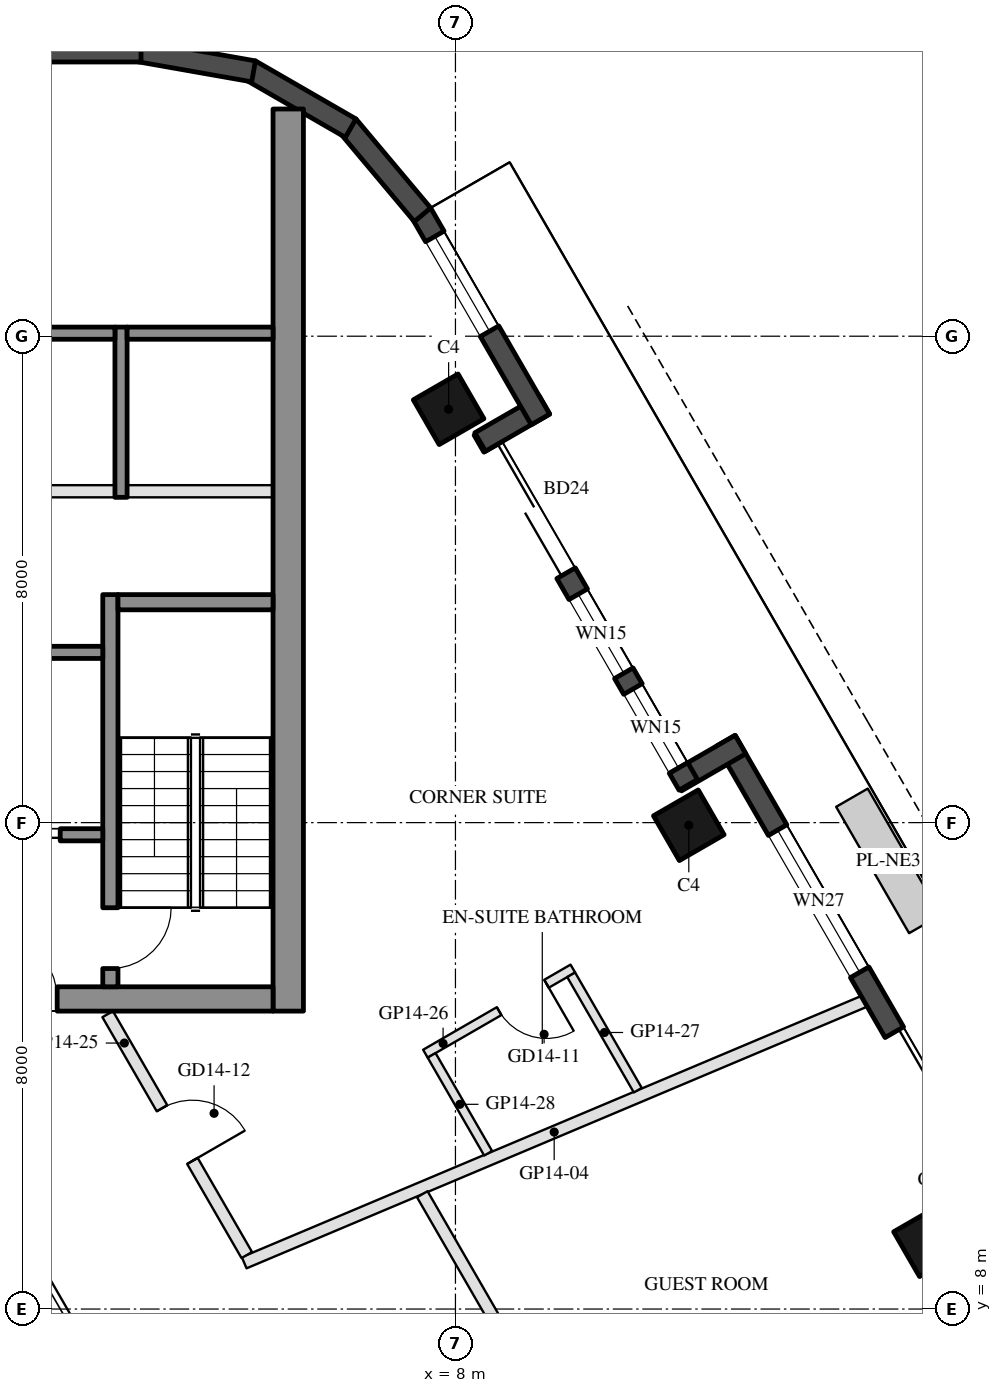
"""IFC4 building model, lengths in metres.
Left out: names, types, materials, properties, quantities, classifications, styles, units other than length and angle.
Written with IfcOpenShell. Run it as: python <this file> out.ifc"""

import sys

from ifc_helpers import new_model, si_unit, direction, frame, frame_2d, origin, origin_2d, place, context, subcontext, project, spatial, rectangle, hollow_rectangle, extrude, element, fill, save


model = new_model("IFC4")
c1 = context("Model", 3, precision=1e-05, world=origin(), true_north=direction((0.0, 1.0)))
c2 = subcontext(c1, "Body", "Model", "MODEL_VIEW")
j1 = project(units=[si_unit("LENGTHUNIT", "METRE"), si_unit("PLANEANGLEUNIT", "RADIAN")], contexts=[c1])
p1 = place(None, origin())
s1 = spatial("IfcSite", under=j1, at=p1, CompositionType="ELEMENT")
p2 = place(p1, origin())
s2 = spatial("IfcBuilding", under=s1, at=p2, CompositionType="ELEMENT")
p3 = place(p2, frame((0.0, 0.0, 161.4)))
s3 = spatial("IfcBuildingStorey", under=s2, at=p3, CompositionType="ELEMENT", Elevation=161.4)
for number, where, z_axis, x_axis in (
    (1, (15.788, 9.115, 0.0), (0.0, 0.0, 1.0), (-0.5, 0.866, 0.0)),
    (2, (11.838, 15.957, 0.0), (0.0, 0.0, 1.0), (-0.5, 0.866, 0.0)),
    (3, (7.888, 22.798, 0.0), (0.0, 0.0, 1.0), (-0.5, 0.866, 0.0)),
):
    element("IfcColumn", number, at=place(p3, frame(where, z_axis=z_axis, x_axis=x_axis)), inside=s3, PredefinedType="COLUMN", context=c2, shape_type="SweptSolid", body=[
        extrude(hollow_rectangle(XDim=0.85, YDim=0.85, WallThickness=0.04, at=origin_2d()), origin(), (0.0, 0.0, 1.0), 3.7),
    ])
p4 = place(p3, frame((17.299, 8.948, 0.0), z_axis=(0.0, 0.0, 1.0), x_axis=(-0.500010041276, 0.866019606374, 0.0)))
e4 = element("IfcWall", 4, at=p4, inside=s3, PredefinedType="SOLIDWALL", context=c2, shape_type="SweptSolid", body=[
    extrude(rectangle(XDim=9.7, YDim=0.35, at=frame_2d((4.85, 0.0))), origin(), (0.0, 0.0, 1.0), 3.55),
])
p5 = place(p4, frame((1.762, 0.0, 0.0)))
e5 = element("IfcOpeningElement", 5, at=p5, cuts=e4, PredefinedType="OPENING", context=c2, shape_type="SweptSolid", body=[
    extrude(rectangle(XDim=2.4, YDim=2.4, at=frame_2d((1.2, 1.2))), frame((0.0, 0.185, 0.0), z_axis=(0.0, -1.0, 0.0), x_axis=(1.0, 0.0, 0.0)), (0.0, 0.0, 1.0), 0.37),
])
p6 = place(p4, frame((5.301, 0.0, 0.3)))
e6 = element("IfcOpeningElement", 6, at=p6, cuts=e4, PredefinedType="OPENING", context=c2, shape_type="SweptSolid", body=[
    extrude(rectangle(XDim=2.7, YDim=2.65, at=frame_2d((1.35, 1.325))), frame((0.0, 0.185, 0.0), z_axis=(0.0, -1.0, 0.0), x_axis=(1.0, 0.0, 0.0)), (0.0, 0.0, 1.0), 0.37),
])
p7 = place(p3, frame((12.688, 17.284, 0.0), z_axis=(0.0, 0.0, 1.0), x_axis=(-0.865955602162, -0.500120880472, 0.0)))
e7 = element("IfcWall", 7, at=p7, inside=s3, PredefinedType="SOLIDWALL", context=c2, shape_type="SweptSolid", body=[
    extrude(rectangle(XDim=1.22, YDim=0.35, at=frame_2d((0.61, 0.0))), origin(), (0.0, 0.0, 1.0), 3.55),
])
p8 = place(p3, frame((11.829, 16.621, 0.0), z_axis=(0.0, 0.0, 1.0), x_axis=(-0.500003597184, 0.866023326939, 0.0)))
e8 = element("IfcWall", 8, at=p8, inside=s3, PredefinedType="SOLIDWALL", context=c2, shape_type="SweptSolid", body=[
    extrude(rectangle(XDim=6.74, YDim=0.35, at=frame_2d((3.37, 0.0))), origin(), (0.0, 0.0, 1.0), 3.55),
])
p9 = place(p8, frame((4.02, 0.0, 0.0)))
e9 = element("IfcOpeningElement", 9, at=p9, cuts=e8, PredefinedType="OPENING", context=c2, shape_type="SweptSolid", body=[
    extrude(rectangle(XDim=2.4, YDim=2.4, at=frame_2d((1.2, 1.2))), frame((0.0, 0.185, 0.0), z_axis=(0.0, -1.0, 0.0), x_axis=(1.0, 0.0, 0.0)), (0.0, 0.0, 1.0), 0.37),
])
p10 = place(p8, frame((0.32, 0.0, 0.3)))
e10 = element("IfcOpeningElement", 10, at=p10, cuts=e8, PredefinedType="OPENING", context=c2, shape_type="SweptSolid", body=[
    extrude(rectangle(XDim=1.5, YDim=2.65, at=frame_2d((0.75, 1.325))), frame((0.0, 0.185, 0.0), z_axis=(0.0, -1.0, 0.0), x_axis=(1.0, 0.0, 0.0)), (0.0, 0.0, 1.0), 0.37),
])
p11 = place(p8, frame((2.12, 0.0, 0.3)))
e11 = element("IfcOpeningElement", 11, at=p11, cuts=e8, PredefinedType="OPENING", context=c2, shape_type="SweptSolid", body=[
    extrude(rectangle(XDim=1.5, YDim=2.65, at=frame_2d((0.75, 1.325))), frame((0.0, 0.185, 0.0), z_axis=(0.0, -1.0, 0.0), x_axis=(1.0, 0.0, 0.0)), (0.0, 0.0, 1.0), 0.37),
])
p12 = place(p3, frame((8.406, 22.26, 0.0), z_axis=(0.0, 0.0, 1.0), x_axis=(0.865955602162, 0.500120880472, 0.0)))
e12 = element("IfcWall", 12, at=p12, inside=s3, PredefinedType="SOLIDWALL", context=c2, shape_type="SweptSolid", body=[
    extrude(rectangle(XDim=1.22, YDim=0.35, at=frame_2d((0.61, 0.0))), origin(), (0.0, 0.0, 1.0), 3.55),
])
p13 = place(p3, frame((9.398, 22.631, 0.0), z_axis=(0.0, 0.0, 1.0), x_axis=(-0.499954521343, 0.866051659307, 0.0)))
e13 = element("IfcWall", 13, at=p13, inside=s3, PredefinedType="SOLIDWALL", context=c2, shape_type="SweptSolid", body=[
    extrude(rectangle(XDim=3.916, YDim=0.35, at=frame_2d((1.958, 0.0))), origin(), (0.0, 0.0, 1.0), 3.55),
])
p14 = place(p13, frame((1.675, 0.0, 0.3)))
e14 = element("IfcOpeningElement", 14, at=p14, cuts=e13, PredefinedType="OPENING", context=c2, shape_type="SweptSolid", body=[
    extrude(rectangle(XDim=1.8, YDim=2.65, at=frame_2d((0.9, 1.325))), frame((0.0, 0.185, 0.0), z_axis=(0.0, -1.0, 0.0), x_axis=(1.0, 0.0, 0.0)), (0.0, 0.0, 1.0), 0.37),
])
p15 = place(p3, frame((7.458, 25.998, 0.0), z_axis=(0.0, 0.0, 1.0), x_axis=(-0.642808304945, 0.766027077259, 0.0)))
e15 = element("IfcWall", 15, at=p15, inside=s3, PredefinedType="SOLIDWALL", context=c2, shape_type="SweptSolid", body=[
    extrude(rectangle(XDim=1.91, YDim=0.35, at=frame_2d((0.955, 0.0))), origin(), (0.0, 0.0, 1.0), 3.55),
])
for number, where, z_axis, x_axis in (
    (16, (6.277, 27.422, 0.0), (0.0, 0.0, 1.0), (-0.866, 0.5, 0.0)),
    (17, (4.68, 28.356, 0.0), (0.0, 0.0, 1.0), (-0.985, 0.174, 0.0)),
):
    element("IfcWall", number, at=place(p3, frame(where, z_axis=z_axis, x_axis=x_axis)), inside=s3, PredefinedType="SOLIDWALL", context=c2, shape_type="SweptSolid", body=[
        extrude(rectangle(XDim=1.91, YDim=0.35, at=frame_2d((0.955, 0.0))), origin(), (0.0, 0.0, 1.0), 3.55),
    ])
p16 = place(p3, frame((2.829, 28.685, 0.0), z_axis=(0.0, 0.0, 1.0), x_axis=(-1.0, 0.0, 0.0)))
e18 = element("IfcWall", 18, at=p16, inside=s3, PredefinedType="SOLIDWALL", context=c2, shape_type="SweptSolid", body=[
    extrude(rectangle(XDim=5.658, YDim=0.35, at=frame_2d((2.829, 0.0))), origin(), (0.0, 0.0, 1.0), 3.55),
])
p17 = place(p3, frame((5.25, 12.9, 0.0), z_axis=(0.0, 0.0, 1.0), x_axis=(0.0, 1.0, 0.0)))
e19 = element("IfcWall", 19, at=p17, inside=s3, PredefinedType="SHEAR", context=c2, shape_type="SweptSolid", body=[
    extrude(rectangle(XDim=14.837, YDim=0.5, at=frame_2d((7.418, 0.0))), origin(), (0.0, 0.0, 1.0), 3.5),
])
p18 = place(p3, frame((5.0, 13.1, 0.0), z_axis=(0.0, 0.0, 1.0), x_axis=(-1.0, 0.0, 0.0)))
e20 = element("IfcWall", 20, at=p18, inside=s3, PredefinedType="SHEAR", context=c2, shape_type="SweptSolid", body=[
    extrude(rectangle(XDim=10.0, YDim=0.4, at=frame_2d((5.0, 0.0))), origin(), (0.0, 0.0, 1.0), 3.5),
])
p19 = place(p18, frame((3.55, 0.0, 0.0)))
e21 = element("IfcOpeningElement", 21, at=p19, cuts=e20, PredefinedType="OPENING", context=c2, shape_type="SweptSolid", body=[
    extrude(rectangle(XDim=1.1, YDim=2.1, at=frame_2d((0.55, 1.05))), frame((0.0, 0.21, 0.0), z_axis=(0.0, -1.0, 0.0), x_axis=(1.0, 0.0, 0.0)), (0.0, 0.0, 1.0), 0.42),
])
p20 = place(p18, frame((5.85, 0.0, 0.0)))
e22 = element("IfcOpeningElement", 22, at=p20, cuts=e20, PredefinedType="OPENING", context=c2, shape_type="SweptSolid", body=[
    extrude(rectangle(XDim=1.4, YDim=2.1, at=frame_2d((0.7, 1.05))), frame((0.0, 0.21, 0.0), z_axis=(0.0, -1.0, 0.0), x_axis=(1.0, 0.0, 0.0)), (0.0, 0.0, 1.0), 0.42),
])
p21 = place(p3, frame((2.325, 13.3, 0.0), z_axis=(0.0, 0.0, 1.0), x_axis=(0.0, 1.0, 0.0)))
e23 = element("IfcWall", 23, at=p21, inside=s3, PredefinedType="SHEAR", context=c2, shape_type="SweptSolid", body=[
    extrude(rectangle(XDim=6.45, YDim=0.25, at=frame_2d((3.225, 0.0))), origin(), (0.0, 0.0, 1.0), 3.5),
])
p22 = place(p21, frame((0.3, 0.0, 0.0)))
e24 = element("IfcOpeningElement", 24, at=p22, cuts=e23, PredefinedType="OPENING", context=c2, shape_type="SweptSolid", body=[
    extrude(rectangle(XDim=1.0, YDim=2.1, at=frame_2d((0.5, 1.05))), frame((0.0, 0.135, 0.0), z_axis=(0.0, -1.0, 0.0), x_axis=(1.0, 0.0, 0.0)), (0.0, 0.0, 1.0), 0.27),
])
p23 = place(p3, frame((5.0, 19.625, 0.0), z_axis=(0.0, 0.0, 1.0), x_axis=(-1.0, 0.0, 0.0)))
e25 = element("IfcWall", 25, at=p23, inside=s3, PredefinedType="SHEAR", context=c2, shape_type="SweptSolid", body=[
    extrude(rectangle(XDim=2.55, YDim=0.25, at=frame_2d((1.275, 0.0))), origin(), (0.0, 0.0, 1.0), 3.5),
])
p24 = place(p3, frame((2.2, 18.8, 0.0), z_axis=(0.0, 0.0, 1.0), x_axis=(-1.0, 0.0, 0.0)))
e26 = element("IfcWall", 26, at=p24, inside=s3, PredefinedType="SHEAR", context=c2, shape_type="SweptSolid", body=[
    extrude(rectangle(XDim=2.8, YDim=0.2, at=frame_2d((1.4, 0.0))), origin(), (0.0, 0.0, 1.0), 3.5),
])
p25 = place(p3, frame((2.2, 15.8, 0.0), z_axis=(0.0, 0.0, 1.0), x_axis=(-1.0, 0.0, 0.0)))
e27 = element("IfcWall", 27, at=p25, inside=s3, PredefinedType="SHEAR", context=c2, shape_type="SweptSolid", body=[
    extrude(rectangle(XDim=2.8, YDim=0.2, at=frame_2d((1.4, 0.0))), origin(), (0.0, 0.0, 1.0), 3.5),
])
p26 = place(p25, frame((0.7, 0.0, 0.0)))
e28 = element("IfcOpeningElement", 28, at=p26, cuts=e27, PredefinedType="OPENING", context=c2, shape_type="SweptSolid", body=[
    extrude(rectangle(XDim=1.2, YDim=2.1, at=frame_2d((0.6, 1.05))), frame((0.0, 0.11, 0.0), z_axis=(0.0, -1.0, 0.0), x_axis=(1.0, 0.0, 0.0)), (0.0, 0.0, 1.0), 0.22),
])
p27 = place(p3, frame((2.5, 21.35, 0.0), z_axis=(0.0, 0.0, 1.0), x_axis=(0.0, 1.0, 0.0)))
e29 = element("IfcWall", 29, at=p27, inside=s3, PredefinedType="SHEAR", context=c2, shape_type="SweptSolid", body=[
    extrude(rectangle(XDim=2.8, YDim=0.2, at=frame_2d((1.4, 0.0))), origin(), (0.0, 0.0, 1.0), 3.5),
])
p28 = place(p3, frame((5.0, 24.05, 0.0), z_axis=(0.0, 0.0, 1.0), x_axis=(-1.0, 0.0, 0.0)))
e30 = element("IfcWall", 30, at=p28, inside=s3, PredefinedType="SHEAR", context=c2, shape_type="SweptSolid", body=[
    extrude(rectangle(XDim=2.4, YDim=0.2, at=frame_2d((1.2, 0.0))), origin(), (0.0, 0.0, 1.0), 3.5),
])
p29 = place(p3, frame((2.4, 24.05, 0.0), z_axis=(0.0, 0.0, 1.0), x_axis=(-1.0, 0.0, 0.0)))
e31 = element("IfcWall", 31, at=p29, inside=s3, PredefinedType="SHEAR", context=c2, shape_type="SweptSolid", body=[
    extrude(rectangle(XDim=2.8, YDim=0.2, at=frame_2d((1.4, 0.0))), origin(), (0.0, 0.0, 1.0), 3.5),
])
p30 = place(p3, frame((5.0, 21.45, 0.0), z_axis=(0.0, 0.0, 1.0), x_axis=(-1.0, 0.0, 0.0)))
e32 = element("IfcWall", 32, at=p30, inside=s3, PredefinedType="PARTITIONING", context=c2, shape_type="SweptSolid", body=[
    extrude(rectangle(XDim=2.4, YDim=0.2, at=frame_2d((1.2, 0.0))), origin(), (0.0, 0.0, 1.0), 3.5),
])
p31 = place(p3, frame((2.4, 21.45, 0.0), z_axis=(0.0, 0.0, 1.0), x_axis=(-1.0, 0.0, 0.0)))
e33 = element("IfcWall", 33, at=p31, inside=s3, PredefinedType="PARTITIONING", context=c2, shape_type="SweptSolid", body=[
    extrude(rectangle(XDim=2.8, YDim=0.2, at=frame_2d((1.4, 0.0))), origin(), (0.0, 0.0, 1.0), 3.5),
])
p32 = place(p3, frame((14.722, 13.061, 0.0), z_axis=(0.0, 0.0, 1.0), x_axis=(-0.921447968583, -0.388501790465, 0.0)))
e34 = element("IfcWall", 34, at=p32, inside=s3, PredefinedType="PARTITIONING", context=c2, shape_type="SweptSolid", body=[
    extrude(rectangle(XDim=11.066, YDim=0.2, at=frame_2d((5.533, 0.0))), origin(), (0.0, 0.0, 1.0), 2.95),
])
p33 = place(p3, frame((7.455, 9.888, 0.0), z_axis=(0.0, 0.0, 1.0), x_axis=(0.499995688794, -0.866027892846, 0.0)))
e35 = element("IfcWall", 35, at=p33, inside=s3, PredefinedType="PARTITIONING", context=c2, shape_type="SweptSolid", body=[
    extrude(rectangle(XDim=9.307, YDim=0.2, at=frame_2d((4.654, 0.0))), origin(), (0.0, 0.0, 1.0), 2.95),
])
p34 = place(p33, frame((5.849, 0.0, 0.0)))
e36 = element("IfcOpeningElement", 36, at=p34, cuts=e35, PredefinedType="OPENING", context=c2, shape_type="SweptSolid", body=[
    extrude(rectangle(XDim=1.0, YDim=2.1, at=frame_2d((0.5, 1.05))), frame((0.0, 0.11, 0.0), z_axis=(0.0, -1.0, 0.0), x_axis=(1.0, 0.0, 0.0)), (0.0, 0.0, 1.0), 0.22),
])
p35 = place(p3, frame((2.281, 12.85, 0.0), z_axis=(0.0, 0.0, 1.0), x_axis=(0.500030411023, -0.86600784526, 0.0)))
e37 = element("IfcWall", 37, at=p35, inside=s3, PredefinedType="PARTITIONING", context=c2, shape_type="SweptSolid", body=[
    extrude(rectangle(XDim=4.575, YDim=0.2, at=frame_2d((2.288, 0.0))), origin(), (0.0, 0.0, 1.0), 2.95),
])
p36 = place(p35, frame((1.787, 0.0, 0.0)))
e38 = element("IfcOpeningElement", 38, at=p36, cuts=e37, PredefinedType="OPENING", context=c2, shape_type="SweptSolid", body=[
    extrude(rectangle(XDim=1.0, YDim=2.1, at=frame_2d((0.5, 1.05))), frame((0.0, 0.11, 0.0), z_axis=(0.0, -1.0, 0.0), x_axis=(1.0, 0.0, 0.0)), (0.0, 0.0, 1.0), 0.22),
])
p37 = place(p3, frame((9.931, 13.6, 0.0), z_axis=(0.0, 0.0, 1.0), x_axis=(-0.866034573852, -0.49998411664, 0.0)))
e39 = element("IfcWall", 39, at=p37, inside=s3, PredefinedType="PARTITIONING", context=c2, shape_type="SweptSolid", body=[
    extrude(rectangle(XDim=2.8, YDim=0.15, at=frame_2d((1.4, 0.0))), origin(), (0.0, 0.0, 1.0), 3.55),
])
p38 = place(p37, frame((0.5, 0.0, 0.0)))
e40 = element("IfcOpeningElement", 40, at=p38, cuts=e39, PredefinedType="OPENING", context=c2, shape_type="SweptSolid", body=[
    extrude(rectangle(XDim=0.9, YDim=2.1, at=frame_2d((0.45, 1.05))), frame((0.0, 0.085, 0.0), z_axis=(0.0, -1.0, 0.0), x_axis=(1.0, 0.0, 0.0)), (0.0, 0.0, 1.0), 0.17),
])
p39 = place(p3, frame((10.999, 11.6, 0.0), z_axis=(0.0, 0.0, 1.0), x_axis=(-0.499937856693, 0.866061279267, 0.0)))
e41 = element("IfcWall", 41, at=p39, inside=s3, PredefinedType="PARTITIONING", context=c2, shape_type="SweptSolid", body=[
    extrude(rectangle(XDim=2.191, YDim=0.15, at=frame_2d((1.096, 0.0))), origin(), (0.0, 0.0, 1.0), 3.55),
])
p40 = place(p3, frame((8.538, 10.562, 0.0), z_axis=(0.0, 0.0, 1.0), x_axis=(-0.500036928615, 0.866004081989, 0.0)))
e42 = element("IfcWall", 42, at=p40, inside=s3, PredefinedType="PARTITIONING", context=c2, shape_type="SweptSolid", body=[
    extrude(rectangle(XDim=1.859, YDim=0.15, at=frame_2d((0.93, 0.0))), origin(), (0.0, 0.0, 1.0), 3.55),
])
p41 = place(p5, frame((2.4, 0.0, 0.0), z_axis=(0.0, 0.0, 1.0), x_axis=(-1.0, 0.0, 0.0)))
e43 = element("IfcDoor", 43, at=p41, inside=s3, OperationType="SLIDING_TO_LEFT", PredefinedType="DOOR", context=c2, shape_type="SweptSolid", body=[
    extrude(rectangle(XDim=2.4, YDim=2.4, at=frame_2d((1.2, 1.2))), frame((0.0, 0.025, 0.0), z_axis=(0.0, -1.0, 0.0), x_axis=(1.0, 0.0, 0.0)), (0.0, 0.0, 1.0), 0.05),
])
fill(e5, e43)
p42 = place(p6, origin())
e44 = element("IfcWindow", 44, at=p42, inside=s3, PartitioningType="SINGLE_PANEL", PredefinedType="WINDOW", context=c2, shape_type="SweptSolid", body=[
    extrude(rectangle(XDim=2.7, YDim=2.65, at=frame_2d((1.35, 1.325))), frame((0.0, 0.03, 0.0), z_axis=(0.0, -1.0, 0.0), x_axis=(1.0, 0.0, 0.0)), (0.0, 0.0, 1.0), 0.06),
])
fill(e6, e44)
p43 = place(p9, frame((2.4, 0.0, 0.0), z_axis=(0.0, 0.0, 1.0), x_axis=(-1.0, 0.0, 0.0)))
e45 = element("IfcDoor", 45, at=p43, inside=s3, OperationType="SLIDING_TO_LEFT", PredefinedType="DOOR", context=c2, shape_type="SweptSolid", body=[
    extrude(rectangle(XDim=2.4, YDim=2.4, at=frame_2d((1.2, 1.2))), frame((0.0, 0.025, 0.0), z_axis=(0.0, -1.0, 0.0), x_axis=(1.0, 0.0, 0.0)), (0.0, 0.0, 1.0), 0.05),
])
fill(e9, e45)
p44 = place(p10, origin())
e46 = element("IfcWindow", 46, at=p44, inside=s3, PartitioningType="SINGLE_PANEL", PredefinedType="WINDOW", context=c2, shape_type="SweptSolid", body=[
    extrude(rectangle(XDim=1.5, YDim=2.65, at=frame_2d((0.75, 1.325))), frame((0.0, 0.03, 0.0), z_axis=(0.0, -1.0, 0.0), x_axis=(1.0, 0.0, 0.0)), (0.0, 0.0, 1.0), 0.06),
])
fill(e10, e46)
p45 = place(p11, origin())
e47 = element("IfcWindow", 47, at=p45, inside=s3, PartitioningType="SINGLE_PANEL", PredefinedType="WINDOW", context=c2, shape_type="SweptSolid", body=[
    extrude(rectangle(XDim=1.5, YDim=2.65, at=frame_2d((0.75, 1.325))), frame((0.0, 0.03, 0.0), z_axis=(0.0, -1.0, 0.0), x_axis=(1.0, 0.0, 0.0)), (0.0, 0.0, 1.0), 0.06),
])
fill(e11, e47)
p46 = place(p14, origin())
e48 = element("IfcWindow", 48, at=p46, inside=s3, PartitioningType="SINGLE_PANEL", PredefinedType="WINDOW", context=c2, shape_type="SweptSolid", body=[
    extrude(rectangle(XDim=1.8, YDim=2.65, at=frame_2d((0.9, 1.325))), frame((0.0, 0.03, 0.0), z_axis=(0.0, -1.0, 0.0), x_axis=(1.0, 0.0, 0.0)), (0.0, 0.0, 1.0), 0.06),
])
fill(e14, e48)
p47 = place(p26, origin())
e49 = element("IfcDoor", 49, at=p47, inside=s3, OperationType="DOUBLE_DOOR_SLIDING", PredefinedType="DOOR", context=c2, shape_type="SweptSolid", body=[
    extrude(rectangle(XDim=1.2, YDim=2.1, at=frame_2d((0.6, 1.05))), frame((0.0, 0.025, 0.0), z_axis=(0.0, -1.0, 0.0), x_axis=(1.0, 0.0, 0.0)), (0.0, 0.0, 1.0), 0.05),
])
fill(e28, e49)
p48 = place(p19, frame((1.1, 0.0, 0.0), z_axis=(0.0, 0.0, 1.0), x_axis=(-1.0, 0.0, 0.0)))
e50 = element("IfcDoor", 50, at=p48, inside=s3, OperationType="SINGLE_SWING_LEFT", PredefinedType="DOOR", context=c2, shape_type="SweptSolid", body=[
    extrude(rectangle(XDim=1.1, YDim=2.1, at=frame_2d((0.55, 1.05))), frame((0.0, 0.025, 0.0), z_axis=(0.0, -1.0, 0.0), x_axis=(1.0, 0.0, 0.0)), (0.0, 0.0, 1.0), 0.05),
])
fill(e21, e50)
p49 = place(p22, frame((1.0, 0.0, 0.0), z_axis=(0.0, 0.0, 1.0), x_axis=(-1.0, 0.0, 0.0)))
e51 = element("IfcDoor", 51, at=p49, inside=s3, OperationType="SINGLE_SWING_LEFT", PredefinedType="DOOR", context=c2, shape_type="SweptSolid", body=[
    extrude(rectangle(XDim=1.0, YDim=2.1, at=frame_2d((0.5, 1.05))), frame((0.0, 0.025, 0.0), z_axis=(0.0, -1.0, 0.0), x_axis=(1.0, 0.0, 0.0)), (0.0, 0.0, 1.0), 0.05),
])
fill(e24, e51)
p50 = place(p38, origin())
e52 = element("IfcDoor", 52, at=p50, inside=s3, OperationType="SINGLE_SWING_LEFT", PredefinedType="DOOR", context=c2, shape_type="SweptSolid", body=[
    extrude(rectangle(XDim=0.9, YDim=2.1, at=frame_2d((0.45, 1.05))), frame((0.0, 0.025, 0.0), z_axis=(0.0, -1.0, 0.0), x_axis=(1.0, 0.0, 0.0)), (0.0, 0.0, 1.0), 0.05),
])
fill(e40, e52)
p51 = place(p36, origin())
e53 = element("IfcDoor", 53, at=p51, inside=s3, OperationType="SINGLE_SWING_RIGHT", PredefinedType="DOOR", context=c2, shape_type="SweptSolid", body=[
    extrude(rectangle(XDim=1.0, YDim=2.1, at=frame_2d((0.5, 1.05))), frame((0.0, 0.025, 0.0), z_axis=(0.0, -1.0, 0.0), x_axis=(1.0, 0.0, 0.0)), (0.0, 0.0, 1.0), 0.05),
])
fill(e38, e53)
save(model, sys.argv[1])
